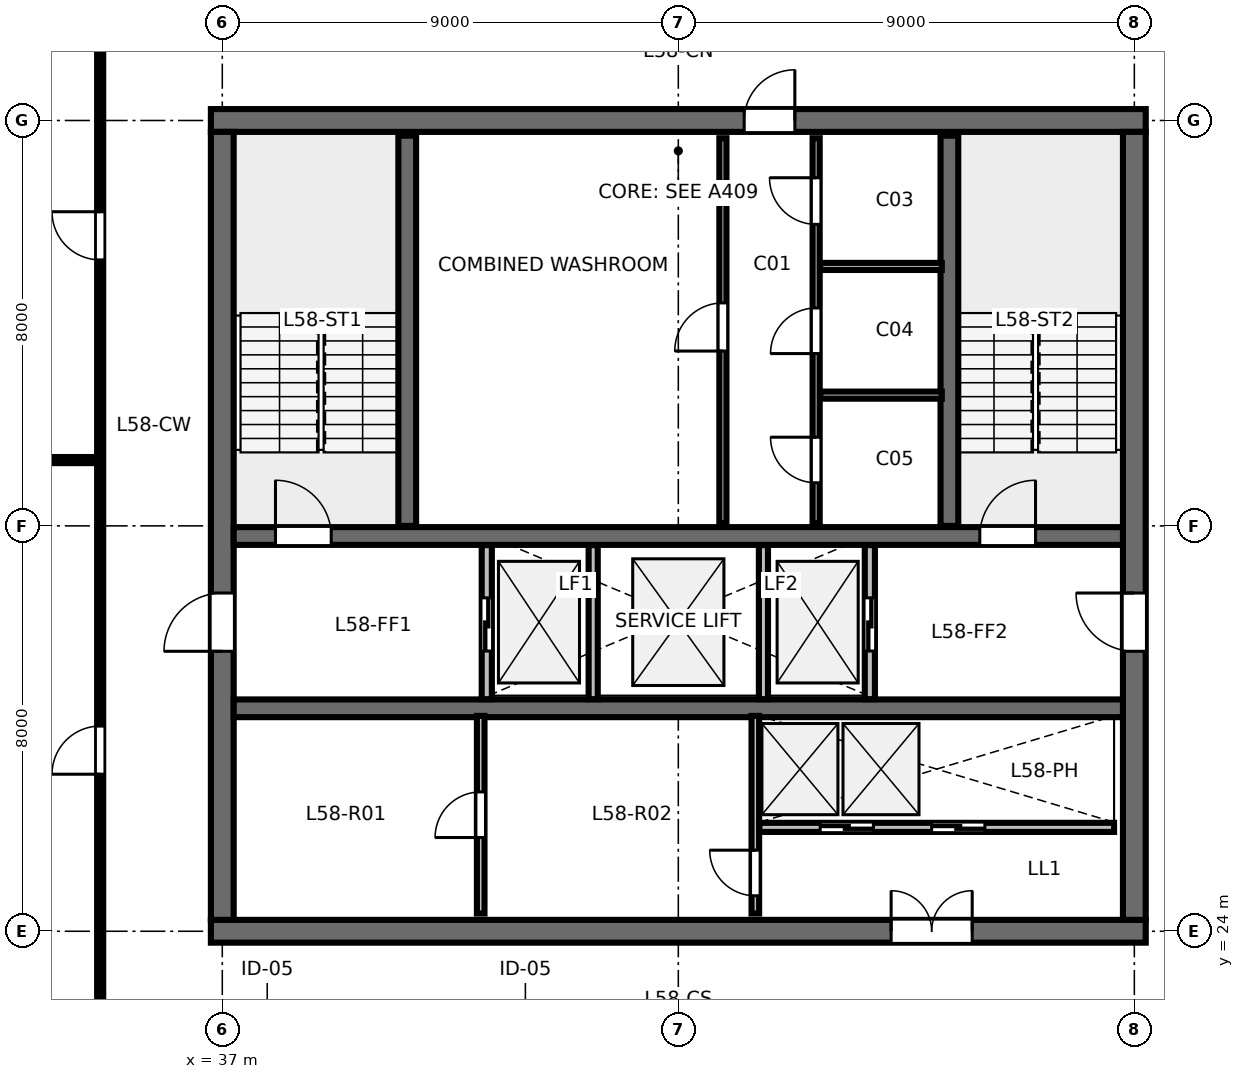
"""IFC4 building model, lengths in metres.
Left out: names, types, materials, properties, quantities, classifications, styles, units other than length and angle.
Written with IfcOpenShell. Run it as: python <this file> out.ifc"""

import sys

from ifc_helpers import new_model, si_unit, direction, frame, frame_2d, origin, place, context, subcontext, project, spatial, rectangle, extrude, element, fill, save


model = new_model("IFC4")
c1 = context("Model", 3, precision=1e-05, world=origin(), true_north=direction((0.0, 1.0)))
c2 = subcontext(c1, "Body", "Model", "MODEL_VIEW")
j1 = project(units=[si_unit("LENGTHUNIT", "METRE"), si_unit("PLANEANGLEUNIT", "RADIAN")], contexts=[c1])
p1 = place(None, origin())
s1 = spatial("IfcSite", under=j1, at=p1, CompositionType="ELEMENT")
p2 = place(p1, origin())
s2 = spatial("IfcBuilding", under=s1, at=p2, CompositionType="ELEMENT")
p3 = place(p2, frame((0.0, 0.0, 220.2)))
s3 = spatial("IfcBuildingStorey", under=s2, at=p3, CompositionType="ELEMENT", Elevation=220.2)
p4 = place(p3, frame((36.775, 24.0, 0.0), z_axis=(0.0, 0.0, 1.0), x_axis=(1.0, 0.0, 0.0)))
e1 = element("IfcWall", 1, at=p4, inside=s3, PredefinedType="SHEAR", context=c2, shape_type="SweptSolid", body=[
    extrude(rectangle(XDim=18.45, YDim=0.45, at=frame_2d((9.225, 0.0))), origin(), (0.0, 0.0, 1.0), 3.36),
])
p5 = place(p4, frame((13.425, 0.0, 0.0)))
e2 = element("IfcOpeningElement", 2, at=p5, cuts=e1, PredefinedType="OPENING", context=c2, shape_type="SweptSolid", body=[
    extrude(rectangle(XDim=1.6, YDim=2.15, at=frame_2d((0.8, 1.075))), frame((0.0, 0.235, 0.0), z_axis=(0.0, -1.0, 0.0), x_axis=(1.0, 0.0, 0.0)), (0.0, 0.0, 1.0), 0.47),
])
p6 = place(p3, frame((36.775, 40.0, 0.0), z_axis=(0.0, 0.0, 1.0), x_axis=(1.0, 0.0, 0.0)))
e3 = element("IfcWall", 3, at=p6, inside=s3, PredefinedType="SHEAR", context=c2, shape_type="SweptSolid", body=[
    extrude(rectangle(XDim=18.45, YDim=0.45, at=frame_2d((9.225, 0.0))), origin(), (0.0, 0.0, 1.0), 3.36),
])
p7 = place(p6, frame((10.525, 0.0, 0.0)))
e4 = element("IfcOpeningElement", 4, at=p7, cuts=e3, PredefinedType="OPENING", context=c2, shape_type="SweptSolid", body=[
    extrude(rectangle(XDim=1.0, YDim=2.15, at=frame_2d((0.5, 1.075))), frame((0.0, 0.235, 0.0), z_axis=(0.0, -1.0, 0.0), x_axis=(1.0, 0.0, 0.0)), (0.0, 0.0, 1.0), 0.47),
])
p8 = place(p3, frame((37.0, 24.225, 0.0), z_axis=(0.0, 0.0, 1.0), x_axis=(0.0, 1.0, 0.0)))
e5 = element("IfcWall", 5, at=p8, inside=s3, PredefinedType="SHEAR", context=c2, shape_type="SweptSolid", body=[
    extrude(rectangle(XDim=15.55, YDim=0.45, at=frame_2d((7.775, 0.0))), origin(), (0.0, 0.0, 1.0), 3.36),
])
p9 = place(p8, frame((5.3, 0.0, 0.0)))
e6 = element("IfcOpeningElement", 6, at=p9, cuts=e5, PredefinedType="OPENING", context=c2, shape_type="SweptSolid", body=[
    extrude(rectangle(XDim=1.15, YDim=2.15, at=frame_2d((0.575, 1.075))), frame((0.0, 0.235, 0.0), z_axis=(0.0, -1.0, 0.0), x_axis=(1.0, 0.0, 0.0)), (0.0, 0.0, 1.0), 0.47),
])
p10 = place(p3, frame((55.0, 24.225, 0.0), z_axis=(0.0, 0.0, 1.0), x_axis=(0.0, 1.0, 0.0)))
e7 = element("IfcWall", 7, at=p10, inside=s3, PredefinedType="SHEAR", context=c2, shape_type="SweptSolid", body=[
    extrude(rectangle(XDim=15.55, YDim=0.45, at=frame_2d((7.775, 0.0))), origin(), (0.0, 0.0, 1.0), 3.36),
])
p11 = place(p10, frame((5.3, 0.0, 0.0)))
e8 = element("IfcOpeningElement", 8, at=p11, cuts=e7, PredefinedType="OPENING", context=c2, shape_type="SweptSolid", body=[
    extrude(rectangle(XDim=1.15, YDim=2.15, at=frame_2d((0.575, 1.075))), frame((0.0, 0.235, 0.0), z_axis=(0.0, -1.0, 0.0), x_axis=(1.0, 0.0, 0.0)), (0.0, 0.0, 1.0), 0.47),
])
p12 = place(p3, frame((37.225, 31.8, 0.0), z_axis=(0.0, 0.0, 1.0), x_axis=(1.0, 0.0, 0.0)))
e9 = element("IfcWall", 9, at=p12, inside=s3, PredefinedType="SHEAR", context=c2, shape_type="SweptSolid", body=[
    extrude(rectangle(XDim=17.55, YDim=0.35, at=frame_2d((8.775, 0.0))), origin(), (0.0, 0.0, 1.0), 3.36),
])
p13 = place(p12, frame((0.825, 0.0, 0.0)))
e10 = element("IfcOpeningElement", 10, at=p13, cuts=e9, PredefinedType="OPENING", context=c2, shape_type="SweptSolid", body=[
    extrude(rectangle(XDim=1.1, YDim=2.15, at=frame_2d((0.55, 1.075))), frame((0.0, 0.185, 0.0), z_axis=(0.0, -1.0, 0.0), x_axis=(1.0, 0.0, 0.0)), (0.0, 0.0, 1.0), 0.37),
])
p14 = place(p12, frame((14.725, 0.0, 0.0)))
e11 = element("IfcOpeningElement", 11, at=p14, cuts=e9, PredefinedType="OPENING", context=c2, shape_type="SweptSolid", body=[
    extrude(rectangle(XDim=1.1, YDim=2.15, at=frame_2d((0.55, 1.075))), frame((0.0, 0.185, 0.0), z_axis=(0.0, -1.0, 0.0), x_axis=(1.0, 0.0, 0.0)), (0.0, 0.0, 1.0), 0.37),
])
p15 = place(p3, frame((37.225, 28.4, 0.0), z_axis=(0.0, 0.0, 1.0), x_axis=(1.0, 0.0, 0.0)))
e12 = element("IfcWall", 12, at=p15, inside=s3, PredefinedType="SHEAR", context=c2, shape_type="SweptSolid", body=[
    extrude(rectangle(XDim=17.55, YDim=0.35, at=frame_2d((8.775, 0.0))), origin(), (0.0, 0.0, 1.0), 3.36),
])
for number, where, z_axis, x_axis in (
    (13, (40.65, 32.0, 0.0), (0.0, 0.0, 1.0), (0.0, 1.0, 0.0)),
    (14, (51.35, 32.0, 0.0), (0.0, 0.0, 1.0), (0.0, 1.0, 0.0)),
):
    element("IfcWall", number, at=place(p3, frame(where, z_axis=z_axis, x_axis=x_axis)), inside=s3, PredefinedType="SHEAR", context=c2, shape_type="SweptSolid", body=[
        extrude(rectangle(XDim=7.7, YDim=0.35, at=frame_2d((3.85, 0.0))), origin(), (0.0, 0.0, 1.0), 3.6),
    ])
p16 = place(p3, frame((46.88, 32.05, 0.0), z_axis=(0.0, 0.0, 1.0), x_axis=(0.0, 1.0, 0.0)))
e15 = element("IfcWall", 15, at=p16, inside=s3, PredefinedType="PARTITIONING", context=c2, shape_type="SweptSolid", body=[
    extrude(rectangle(XDim=7.6, YDim=0.14, at=frame_2d((3.8, 0.0))), origin(), (0.0, 0.0, 1.0), 3.375),
])
p17 = place(p16, frame((3.4, 0.0, 0.0)))
e16 = element("IfcOpeningElement", 16, at=p17, cuts=e15, PredefinedType="OPENING", context=c2, shape_type="SweptSolid", body=[
    extrude(rectangle(XDim=0.95, YDim=2.15, at=frame_2d((0.475, 1.075))), frame((0.0, 0.08, 0.0), z_axis=(0.0, -1.0, 0.0), x_axis=(1.0, 0.0, 0.0)), (0.0, 0.0, 1.0), 0.16),
])
p18 = place(p3, frame((48.72, 32.05, 0.0), z_axis=(0.0, 0.0, 1.0), x_axis=(0.0, 1.0, 0.0)))
e17 = element("IfcWall", 17, at=p18, inside=s3, PredefinedType="PARTITIONING", context=c2, shape_type="SweptSolid", body=[
    extrude(rectangle(XDim=7.6, YDim=0.14, at=frame_2d((3.8, 0.0))), origin(), (0.0, 0.0, 1.0), 3.375),
])
p19 = place(p18, frame((0.8, 0.0, 0.0)))
e18 = element("IfcOpeningElement", 18, at=p19, cuts=e17, PredefinedType="OPENING", context=c2, shape_type="SweptSolid", body=[
    extrude(rectangle(XDim=0.9, YDim=2.15, at=frame_2d((0.45, 1.075))), frame((0.0, 0.08, 0.0), z_axis=(0.0, -1.0, 0.0), x_axis=(1.0, 0.0, 0.0)), (0.0, 0.0, 1.0), 0.16),
])
p20 = place(p18, frame((3.35, 0.0, 0.0)))
e19 = element("IfcOpeningElement", 19, at=p20, cuts=e17, PredefinedType="OPENING", context=c2, shape_type="SweptSolid", body=[
    extrude(rectangle(XDim=0.9, YDim=2.15, at=frame_2d((0.45, 1.075))), frame((0.0, 0.08, 0.0), z_axis=(0.0, -1.0, 0.0), x_axis=(1.0, 0.0, 0.0)), (0.0, 0.0, 1.0), 0.16),
])
p21 = place(p18, frame((5.9, 0.0, 0.0)))
e20 = element("IfcOpeningElement", 20, at=p21, cuts=e17, PredefinedType="OPENING", context=c2, shape_type="SweptSolid", body=[
    extrude(rectangle(XDim=0.92, YDim=2.15, at=frame_2d((0.46, 1.075))), frame((0.0, 0.08, 0.0), z_axis=(0.0, -1.0, 0.0), x_axis=(1.0, 0.0, 0.0)), (0.0, 0.0, 1.0), 0.16),
])
for number, where, z_axis, x_axis in (
    (21, (48.8, 34.58, 0.0), (0.0, 0.0, 1.0), (1.0, 0.0, 0.0)),
    (22, (48.8, 37.12, 0.0), (0.0, 0.0, 1.0), (1.0, 0.0, 0.0)),
):
    element("IfcWall", number, at=place(p3, frame(where, z_axis=z_axis, x_axis=x_axis)), inside=s3, PredefinedType="PARTITIONING", context=c2, shape_type="SweptSolid", body=[
        extrude(rectangle(XDim=2.4, YDim=0.14, at=frame_2d((1.2, 0.0))), origin(), (0.0, 0.0, 1.0), 3.375),
    ])
p22 = place(p3, frame((42.22, 28.58, 0.0), z_axis=(0.0, 0.0, 1.0), x_axis=(0.0, 1.0, 0.0)))
e23 = element("IfcWall", 23, at=p22, inside=s3, PredefinedType="PARTITIONING", context=c2, shape_type="SweptSolid", body=[
    extrude(rectangle(XDim=3.04, YDim=0.2, at=frame_2d((1.52, 0.0))), origin(), (0.0, 0.0, 1.0), 3.375),
])
p23 = place(p22, frame((0.95, 0.0, 0.0)))
e24 = element("IfcOpeningElement", 24, at=p23, cuts=e23, PredefinedType="OPENING", context=c2, shape_type="SweptSolid", body=[
    extrude(rectangle(XDim=1.05, YDim=2.15, at=frame_2d((0.525, 1.075))), frame((0.0, 0.11, 0.0), z_axis=(0.0, -1.0, 0.0), x_axis=(1.0, 0.0, 0.0)), (0.0, 0.0, 1.0), 0.22),
])
p24 = place(p3, frame((49.78, 28.58, 0.0), z_axis=(0.0, 0.0, 1.0), x_axis=(0.0, 1.0, 0.0)))
e25 = element("IfcWall", 25, at=p24, inside=s3, PredefinedType="PARTITIONING", context=c2, shape_type="SweptSolid", body=[
    extrude(rectangle(XDim=3.04, YDim=0.2, at=frame_2d((1.52, 0.0))), origin(), (0.0, 0.0, 1.0), 3.375),
])
p25 = place(p24, frame((0.95, 0.0, 0.0)))
e26 = element("IfcOpeningElement", 26, at=p25, cuts=e25, PredefinedType="OPENING", context=c2, shape_type="SweptSolid", body=[
    extrude(rectangle(XDim=1.05, YDim=2.15, at=frame_2d((0.525, 1.075))), frame((0.0, 0.11, 0.0), z_axis=(0.0, -1.0, 0.0), x_axis=(1.0, 0.0, 0.0)), (0.0, 0.0, 1.0), 0.22),
])
for number, where, z_axis, x_axis in (
    (27, (44.32, 28.58, 0.0), (0.0, 0.0, 1.0), (0.0, 1.0, 0.0)),
    (28, (47.68, 28.58, 0.0), (0.0, 0.0, 1.0), (0.0, 1.0, 0.0)),
):
    element("IfcWall", number, at=place(p3, frame(where, z_axis=z_axis, x_axis=x_axis)), inside=s3, PredefinedType="PARTITIONING", context=c2, shape_type="SweptSolid", body=[
        extrude(rectangle(XDim=3.04, YDim=0.18, at=frame_2d((1.52, 0.0))), origin(), (0.0, 0.0, 1.0), 3.375),
    ])
p26 = place(p3, frame((42.1, 24.35, 0.0), z_axis=(0.0, 0.0, 1.0), x_axis=(0.0, 1.0, 0.0)))
e29 = element("IfcWall", 29, at=p26, inside=s3, PredefinedType="PARTITIONING", context=c2, shape_type="SweptSolid", body=[
    extrude(rectangle(XDim=3.9, YDim=0.15, at=frame_2d((1.95, 0.0))), origin(), (0.0, 0.0, 1.0), 3.375),
])
p27 = place(p26, frame((1.5, 0.0, 0.0)))
e30 = element("IfcOpeningElement", 30, at=p27, cuts=e29, PredefinedType="OPENING", context=c2, shape_type="SweptSolid", body=[
    extrude(rectangle(XDim=0.9, YDim=2.15, at=frame_2d((0.45, 1.075))), frame((0.0, 0.085, 0.0), z_axis=(0.0, -1.0, 0.0), x_axis=(1.0, 0.0, 0.0)), (0.0, 0.0, 1.0), 0.17),
])
p28 = place(p3, frame((47.52, 24.35, 0.0), z_axis=(0.0, 0.0, 1.0), x_axis=(0.0, 1.0, 0.0)))
e31 = element("IfcWall", 31, at=p28, inside=s3, PredefinedType="PARTITIONING", context=c2, shape_type="SweptSolid", body=[
    extrude(rectangle(XDim=3.9, YDim=0.15, at=frame_2d((1.95, 0.0))), origin(), (0.0, 0.0, 1.0), 3.375),
])
p29 = place(p28, frame((0.35, 0.0, 0.0)))
e32 = element("IfcOpeningElement", 32, at=p29, cuts=e31, PredefinedType="OPENING", context=c2, shape_type="SweptSolid", body=[
    extrude(rectangle(XDim=0.9, YDim=2.15, at=frame_2d((0.45, 1.075))), frame((0.0, 0.085, 0.0), z_axis=(0.0, -1.0, 0.0), x_axis=(1.0, 0.0, 0.0)), (0.0, 0.0, 1.0), 0.17),
])
p30 = place(p3, frame((47.6, 26.05, 0.0), z_axis=(0.0, 0.0, 1.0), x_axis=(1.0, 0.0, 0.0)))
e33 = element("IfcWall", 33, at=p30, inside=s3, PredefinedType="PARTITIONING", context=c2, shape_type="SweptSolid", body=[
    extrude(rectangle(XDim=7.0, YDim=0.18, at=frame_2d((3.5, 0.0))), origin(), (0.0, 0.0, 1.0), 3.375),
])
p31 = place(p30, frame((1.2, 0.0, 0.0)))
e34 = element("IfcOpeningElement", 34, at=p31, cuts=e33, PredefinedType="OPENING", context=c2, shape_type="SweptSolid", body=[
    extrude(rectangle(XDim=1.05, YDim=2.15, at=frame_2d((0.525, 1.075))), frame((0.0, 0.1, 0.0), z_axis=(0.0, -1.0, 0.0), x_axis=(1.0, 0.0, 0.0)), (0.0, 0.0, 1.0), 0.2),
])
p32 = place(p30, frame((3.4, 0.0, 0.0)))
e35 = element("IfcOpeningElement", 35, at=p32, cuts=e33, PredefinedType="OPENING", context=c2, shape_type="SweptSolid", body=[
    extrude(rectangle(XDim=1.05, YDim=2.15, at=frame_2d((0.525, 1.075))), frame((0.0, 0.1, 0.0), z_axis=(0.0, -1.0, 0.0), x_axis=(1.0, 0.0, 0.0)), (0.0, 0.0, 1.0), 0.2),
])
p33 = place(p3, frame((34.59, 33.299, 0.0), z_axis=(0.0, 0.0, 1.0), x_axis=(-1.0, 0.0, 0.0)))
e36 = element("IfcWall", 36, at=p33, inside=s3, PredefinedType="PARTITIONING", context=c2, shape_type="SweptSolid", body=[
    extrude(rectangle(XDim=8.183, YDim=0.12, at=frame_2d((4.091, 0.0))), origin(), (0.0, 0.0, 1.0), 2.655),
])
p34 = place(p33, frame((1.4, 0.0, 0.0)))
e37 = element("IfcOpeningElement", 37, at=p34, cuts=e36, PredefinedType="OPENING", context=c2, shape_type="SweptSolid", body=[
    extrude(rectangle(XDim=0.9, YDim=2.15, at=frame_2d((0.45, 1.075))), frame((0.0, 0.07, 0.0), z_axis=(0.0, -1.0, 0.0), x_axis=(1.0, 0.0, 0.0)), (0.0, 0.0, 1.0), 0.14),
])
p35 = place(p3, frame((34.59, 21.65, 0.0), z_axis=(0.0, 0.0, 1.0), x_axis=(0.0, 1.0, 0.0)))
e38 = element("IfcWall", 38, at=p35, inside=s3, PredefinedType="PARTITIONING", context=c2, shape_type="SweptSolid", body=[
    extrude(rectangle(XDim=20.7, YDim=0.12, at=frame_2d((10.35, 0.0))), origin(), (0.0, 0.0, 1.0), 2.655),
])
p36 = place(p35, frame((5.449, 0.0, 0.0)))
e39 = element("IfcOpeningElement", 39, at=p36, cuts=e38, PredefinedType="OPENING", context=c2, shape_type="SweptSolid", body=[
    extrude(rectangle(XDim=0.95, YDim=2.15, at=frame_2d((0.475, 1.075))), frame((0.0, 0.07, 0.0), z_axis=(0.0, -1.0, 0.0), x_axis=(1.0, 0.0, 0.0)), (0.0, 0.0, 1.0), 0.14),
])
p37 = place(p35, frame((15.599, 0.0, 0.0)))
e40 = element("IfcOpeningElement", 40, at=p37, cuts=e38, PredefinedType="OPENING", context=c2, shape_type="SweptSolid", body=[
    extrude(rectangle(XDim=0.95, YDim=2.15, at=frame_2d((0.475, 1.075))), frame((0.0, 0.07, 0.0), z_axis=(0.0, -1.0, 0.0), x_axis=(1.0, 0.0, 0.0)), (0.0, 0.0, 1.0), 0.14),
])
p38 = place(p13, origin())
e41 = element("IfcDoor", 41, at=p38, inside=s3, OperationType="SINGLE_SWING_LEFT", PredefinedType="DOOR", context=c2, shape_type="SweptSolid", body=[
    extrude(rectangle(XDim=1.1, YDim=2.15, at=frame_2d((0.55, 1.075))), frame((0.0, 0.025, 0.0), z_axis=(0.0, -1.0, 0.0), x_axis=(1.0, 0.0, 0.0)), (0.0, 0.0, 1.0), 0.05),
])
fill(e10, e41)
p39 = place(p14, origin())
e42 = element("IfcDoor", 42, at=p39, inside=s3, OperationType="SINGLE_SWING_RIGHT", PredefinedType="DOOR", context=c2, shape_type="SweptSolid", body=[
    extrude(rectangle(XDim=1.1, YDim=2.15, at=frame_2d((0.55, 1.075))), frame((0.0, 0.025, 0.0), z_axis=(0.0, -1.0, 0.0), x_axis=(1.0, 0.0, 0.0)), (0.0, 0.0, 1.0), 0.05),
])
fill(e11, e42)
p40 = place(p7, origin())
e43 = element("IfcDoor", 43, at=p40, inside=s3, OperationType="SINGLE_SWING_RIGHT", PredefinedType="DOOR", context=c2, shape_type="SweptSolid", body=[
    extrude(rectangle(XDim=1.0, YDim=2.15, at=frame_2d((0.5, 1.075))), frame((0.0, 0.025, 0.0), z_axis=(0.0, -1.0, 0.0), x_axis=(1.0, 0.0, 0.0)), (0.0, 0.0, 1.0), 0.05),
])
fill(e4, e43)
p41 = place(p9, origin())
e44 = element("IfcDoor", 44, at=p41, inside=s3, OperationType="SINGLE_SWING_LEFT", PredefinedType="DOOR", context=c2, shape_type="SweptSolid", body=[
    extrude(rectangle(XDim=1.15, YDim=2.15, at=frame_2d((0.575, 1.075))), frame((0.0, 0.025, 0.0), z_axis=(0.0, -1.0, 0.0), x_axis=(1.0, 0.0, 0.0)), (0.0, 0.0, 1.0), 0.05),
])
fill(e6, e44)
p42 = place(p11, origin())
e45 = element("IfcDoor", 45, at=p42, inside=s3, OperationType="SINGLE_SWING_RIGHT", PredefinedType="DOOR", context=c2, shape_type="SweptSolid", body=[
    extrude(rectangle(XDim=1.15, YDim=2.15, at=frame_2d((0.575, 1.075))), frame((0.0, 0.025, 0.0), z_axis=(0.0, -1.0, 0.0), x_axis=(1.0, 0.0, 0.0)), (0.0, 0.0, 1.0), 0.05),
])
fill(e8, e45)
p43 = place(p5, origin())
e46 = element("IfcDoor", 46, at=p43, inside=s3, OperationType="DOUBLE_DOOR_SINGLE_SWING", PredefinedType="DOOR", context=c2, shape_type="SweptSolid", body=[
    extrude(rectangle(XDim=1.6, YDim=2.15, at=frame_2d((0.8, 1.075))), frame((0.0, 0.025, 0.0), z_axis=(0.0, -1.0, 0.0), x_axis=(1.0, 0.0, 0.0)), (0.0, 0.0, 1.0), 0.05),
])
fill(e2, e46)
p44 = place(p17, origin())
e47 = element("IfcDoor", 47, at=p44, inside=s3, OperationType="SINGLE_SWING_LEFT", PredefinedType="DOOR", context=c2, shape_type="SweptSolid", body=[
    extrude(rectangle(XDim=0.95, YDim=2.15, at=frame_2d((0.475, 1.075))), frame((0.0, 0.025, 0.0), z_axis=(0.0, -1.0, 0.0), x_axis=(1.0, 0.0, 0.0)), (0.0, 0.0, 1.0), 0.05),
])
fill(e16, e47)
p45 = place(p19, origin())
e48 = element("IfcDoor", 48, at=p45, inside=s3, OperationType="SINGLE_SWING_RIGHT", PredefinedType="DOOR", context=c2, shape_type="SweptSolid", body=[
    extrude(rectangle(XDim=0.9, YDim=2.15, at=frame_2d((0.45, 1.075))), frame((0.0, 0.025, 0.0), z_axis=(0.0, -1.0, 0.0), x_axis=(1.0, 0.0, 0.0)), (0.0, 0.0, 1.0), 0.05),
])
fill(e18, e48)
p46 = place(p20, origin())
e49 = element("IfcDoor", 49, at=p46, inside=s3, OperationType="SINGLE_SWING_LEFT", PredefinedType="DOOR", context=c2, shape_type="SweptSolid", body=[
    extrude(rectangle(XDim=0.9, YDim=2.15, at=frame_2d((0.45, 1.075))), frame((0.0, 0.025, 0.0), z_axis=(0.0, -1.0, 0.0), x_axis=(1.0, 0.0, 0.0)), (0.0, 0.0, 1.0), 0.05),
])
fill(e19, e49)
p47 = place(p21, origin())
e50 = element("IfcDoor", 50, at=p47, inside=s3, OperationType="SINGLE_SWING_RIGHT", PredefinedType="DOOR", context=c2, shape_type="SweptSolid", body=[
    extrude(rectangle(XDim=0.92, YDim=2.15, at=frame_2d((0.46, 1.075))), frame((0.0, 0.025, 0.0), z_axis=(0.0, -1.0, 0.0), x_axis=(1.0, 0.0, 0.0)), (0.0, 0.0, 1.0), 0.05),
])
fill(e20, e50)
p48 = place(p23, origin())
e51 = element("IfcDoor", 51, at=p48, inside=s3, OperationType="SLIDING_TO_LEFT", PredefinedType="DOOR", context=c2, shape_type="SweptSolid", body=[
    extrude(rectangle(XDim=1.05, YDim=2.15, at=frame_2d((0.525, 1.075))), frame((0.0, 0.025, 0.0), z_axis=(0.0, -1.0, 0.0), x_axis=(1.0, 0.0, 0.0)), (0.0, 0.0, 1.0), 0.05),
])
fill(e24, e51)
p49 = place(p25, origin())
e52 = element("IfcDoor", 52, at=p49, inside=s3, OperationType="SLIDING_TO_RIGHT", PredefinedType="DOOR", context=c2, shape_type="SweptSolid", body=[
    extrude(rectangle(XDim=1.05, YDim=2.15, at=frame_2d((0.525, 1.075))), frame((0.0, 0.025, 0.0), z_axis=(0.0, -1.0, 0.0), x_axis=(1.0, 0.0, 0.0)), (0.0, 0.0, 1.0), 0.05),
])
fill(e26, e52)
p50 = place(p27, origin())
e53 = element("IfcDoor", 53, at=p50, inside=s3, OperationType="SINGLE_SWING_LEFT", PredefinedType="DOOR", context=c2, shape_type="SweptSolid", body=[
    extrude(rectangle(XDim=0.9, YDim=2.15, at=frame_2d((0.45, 1.075))), frame((0.0, 0.025, 0.0), z_axis=(0.0, -1.0, 0.0), x_axis=(1.0, 0.0, 0.0)), (0.0, 0.0, 1.0), 0.05),
])
fill(e30, e53)
p51 = place(p29, origin())
e54 = element("IfcDoor", 54, at=p51, inside=s3, OperationType="SINGLE_SWING_RIGHT", PredefinedType="DOOR", context=c2, shape_type="SweptSolid", body=[
    extrude(rectangle(XDim=0.9, YDim=2.15, at=frame_2d((0.45, 1.075))), frame((0.0, 0.025, 0.0), z_axis=(0.0, -1.0, 0.0), x_axis=(1.0, 0.0, 0.0)), (0.0, 0.0, 1.0), 0.05),
])
fill(e32, e54)
p52 = place(p31, origin())
e55 = element("IfcDoor", 55, at=p52, inside=s3, OperationType="SLIDING_TO_LEFT", PredefinedType="DOOR", context=c2, shape_type="SweptSolid", body=[
    extrude(rectangle(XDim=1.05, YDim=2.15, at=frame_2d((0.525, 1.075))), frame((0.0, 0.025, 0.0), z_axis=(0.0, -1.0, 0.0), x_axis=(1.0, 0.0, 0.0)), (0.0, 0.0, 1.0), 0.05),
])
fill(e34, e55)
p53 = place(p32, origin())
e56 = element("IfcDoor", 56, at=p53, inside=s3, OperationType="SLIDING_TO_RIGHT", PredefinedType="DOOR", context=c2, shape_type="SweptSolid", body=[
    extrude(rectangle(XDim=1.05, YDim=2.15, at=frame_2d((0.525, 1.075))), frame((0.0, 0.025, 0.0), z_axis=(0.0, -1.0, 0.0), x_axis=(1.0, 0.0, 0.0)), (0.0, 0.0, 1.0), 0.05),
])
fill(e35, e56)
p54 = place(p36, origin())
e57 = element("IfcDoor", 57, at=p54, inside=s3, OperationType="SINGLE_SWING_LEFT", PredefinedType="DOOR", context=c2, shape_type="SweptSolid", body=[
    extrude(rectangle(XDim=0.95, YDim=2.15, at=frame_2d((0.475, 1.075))), frame((0.0, 0.025, 0.0), z_axis=(0.0, -1.0, 0.0), x_axis=(1.0, 0.0, 0.0)), (0.0, 0.0, 1.0), 0.05),
])
fill(e39, e57)
p55 = place(p37, origin())
e58 = element("IfcDoor", 58, at=p55, inside=s3, OperationType="SINGLE_SWING_RIGHT", PredefinedType="DOOR", context=c2, shape_type="SweptSolid", body=[
    extrude(rectangle(XDim=0.95, YDim=2.15, at=frame_2d((0.475, 1.075))), frame((0.0, 0.025, 0.0), z_axis=(0.0, -1.0, 0.0), x_axis=(1.0, 0.0, 0.0)), (0.0, 0.0, 1.0), 0.05),
])
fill(e40, e58)
save(model, sys.argv[1])
